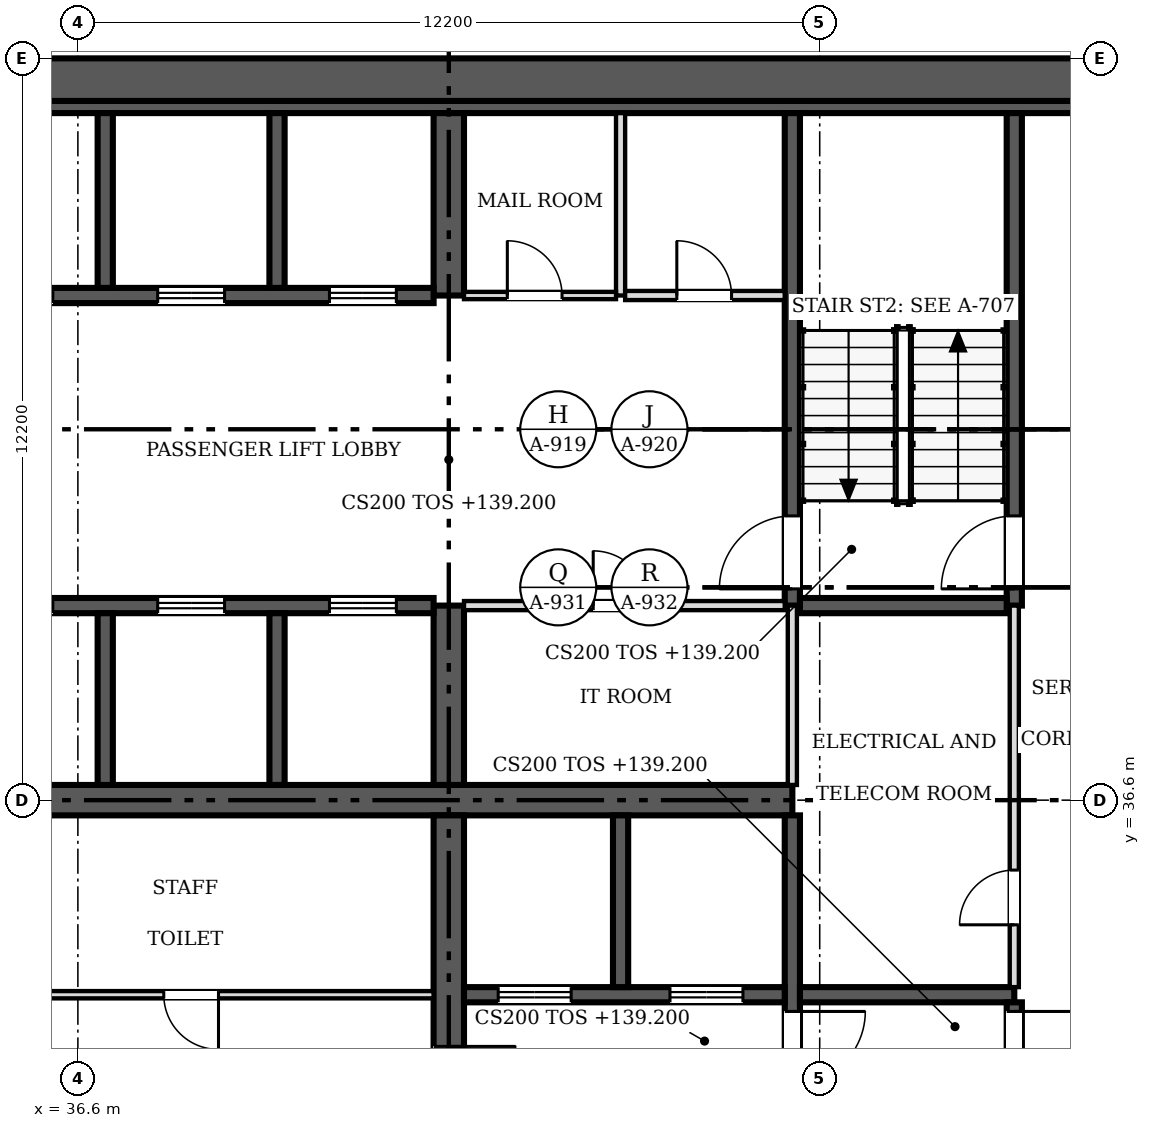
"""IFC4 building model, lengths in metres.
Left out: names, types, materials, properties, quantities, classifications, styles, units other than length and angle.
Written with IfcOpenShell. Run it as: python <this file> out.ifc"""

import sys

from ifc_helpers import new_model, si_unit, direction, frame, frame_2d, origin, place, context, subcontext, project, spatial, rectangle, extrude, source, transform, mapped, element, fill, save


model = new_model("IFC4")
c1 = context("Model", 3, precision=1e-05, world=origin(), true_north=direction((0.0, 1.0)))
c2 = subcontext(c1, "Body", "Model", "MODEL_VIEW")
j1 = project(units=[si_unit("LENGTHUNIT", "METRE"), si_unit("PLANEANGLEUNIT", "RADIAN")], contexts=[c1])
p1 = place(None, origin())
s1 = spatial("IfcSite", under=j1, at=p1, CompositionType="ELEMENT")
p2 = place(p1, origin())
s2 = spatial("IfcBuilding", under=s1, at=p2, CompositionType="ELEMENT")
p3 = place(p2, frame((0.0, 0.0, 139.2)))
s3 = spatial("IfcBuildingStorey", under=s2, at=p3, CompositionType="ELEMENT", Elevation=139.2)
p4 = place(p3, frame((30.5, 48.45, 0.0), z_axis=(0.0, 0.0, 1.0), x_axis=(1.0, 0.0, 0.0)))
e1 = element("IfcWall", 1, at=p4, inside=s3, PredefinedType="SHEAR", context=c2, shape_type="SweptSolid", body=[
    extrude(rectangle(XDim=24.4, YDim=0.7, at=frame_2d((12.2, 0.0))), origin(), (0.0, 0.0, 1.0), 3.8),
])
p5 = place(p3, frame((31.2, 48.0, 0.0), z_axis=(0.0, 0.0, 1.0), x_axis=(1.0, 0.0, 0.0)))
e2 = element("IfcWall", 2, at=p5, inside=s3, PredefinedType="SOLIDWALL", context=c2, shape_type="SweptSolid", body=[
    extrude(rectangle(XDim=23.0, YDim=0.2, at=frame_2d((11.5, 0.0))), origin(), (0.0, 0.0, 1.0), 3.8),
])
p6 = place(p3, frame((31.4, 36.6, 0.0), z_axis=(0.0, 0.0, 1.0), x_axis=(1.0, 0.0, 0.0)))
e3 = element("IfcWall", 3, at=p6, inside=s3, PredefinedType="SHEAR", context=c2, shape_type="SweptSolid", body=[
    extrude(rectangle(XDim=16.95, YDim=0.5, at=frame_2d((8.475, 0.0))), origin(), (0.0, 0.0, 1.0), 3.8),
])
p7 = place(p3, frame((42.7, 36.35, 0.0), z_axis=(0.0, 0.0, 1.0), x_axis=(0.0, -1.0, 0.0)))
e4 = element("IfcWall", 4, at=p7, inside=s3, PredefinedType="SHEAR", context=c2, shape_type="SweptSolid", body=[
    extrude(rectangle(XDim=11.05, YDim=0.5, at=frame_2d((5.525, 0.0))), origin(), (0.0, 0.0, 1.0), 3.8),
])
m1 = source(origin(), c2, "Body", "SweptSolid", [
    extrude(rectangle(XDim=0.9, YDim=2.1, at=frame_2d((0.45, 1.05))), frame((0.0, 0.26, 0.0), z_axis=(0.0, -1.0, 0.0), x_axis=(1.0, 0.0, 0.0)), (0.0, 0.0, 1.0), 0.52),
])
p8 = place(p7, frame((6.5, 0.0, 0.0)))
e5 = element("IfcOpeningElement", 5, at=p8, cuts=e4, PredefinedType="OPENING", context=c2, shape_type="MappedRepresentation", body=[
    mapped(m1, transform((0.0, 0.0, 0.0), scale=1.0)),
])
m2 = source(origin(), c2, "Body", "SweptSolid", [
    extrude(rectangle(XDim=1.1, YDim=2.1, at=frame_2d((0.55, 1.05))), frame((0.0, 0.26, 0.0), z_axis=(0.0, -1.0, 0.0), x_axis=(1.0, 0.0, 0.0)), (0.0, 0.0, 1.0), 0.52),
])
p9 = place(p7, frame((3.8, 0.0, 0.0)))
e6 = element("IfcOpeningElement", 6, at=p9, cuts=e4, PredefinedType="OPENING", context=c2, shape_type="MappedRepresentation", body=[
    mapped(m2, transform((0.0, 0.0, 0.0), scale=1.0)),
])
p10 = place(p3, frame((42.7, 36.85, 0.0), z_axis=(0.0, 0.0, 1.0), x_axis=(0.0, 1.0, 0.0)))
e7 = element("IfcWall", 7, at=p10, inside=s3, PredefinedType="SHEAR", context=c2, shape_type="SweptSolid", body=[
    extrude(rectangle(XDim=2.95, YDim=0.5, at=frame_2d((1.475, 0.0))), origin(), (0.0, 0.0, 1.0), 3.8),
])
p11 = place(p3, frame((42.7, 44.9, 0.0), z_axis=(0.0, 0.0, 1.0), x_axis=(0.0, 1.0, 0.0)))
e8 = element("IfcWall", 8, at=p11, inside=s3, PredefinedType="SHEAR", context=c2, shape_type="SweptSolid", body=[
    extrude(rectangle(XDim=3.0, YDim=0.5, at=frame_2d((1.5, 0.0))), origin(), (0.0, 0.0, 1.0), 3.8),
])
p12 = place(p3, frame((31.4, 39.8, 0.0), z_axis=(0.0, 0.0, 1.0), x_axis=(1.0, 0.0, 0.0)))
e9 = element("IfcWall", 9, at=p12, inside=s3, PredefinedType="SOLIDWALL", context=c2, shape_type="SweptSolid", body=[
    extrude(rectangle(XDim=11.05, YDim=0.25, at=frame_2d((5.525, 0.0))), origin(), (0.0, 0.0, 1.0), 3.8),
])
m3 = source(origin(), c2, "Body", "SweptSolid", [
    extrude(rectangle(XDim=1.1, YDim=2.1, at=frame_2d((0.55, 1.05))), frame((0.0, 0.135, 0.0), z_axis=(0.0, -1.0, 0.0), x_axis=(1.0, 0.0, 0.0)), (0.0, 0.0, 1.0), 0.27),
])
p13 = place(p12, frame((0.863, 0.0, 0.0)))
e10 = element("IfcOpeningElement", 10, at=p13, cuts=e9, PredefinedType="OPENING", context=c2, shape_type="MappedRepresentation", body=[
    mapped(m3, transform((0.0, 0.0, 0.0), scale=1.0)),
])
p14 = place(p12, frame((3.688, 0.0, 0.0)))
e11 = element("IfcOpeningElement", 11, at=p14, cuts=e9, PredefinedType="OPENING", context=c2, shape_type="MappedRepresentation", body=[
    mapped(m3, transform((0.0, 0.0, 0.0), scale=1.0)),
])
p15 = place(p12, frame((6.512, 0.0, 0.0)))
e12 = element("IfcOpeningElement", 12, at=p15, cuts=e9, PredefinedType="OPENING", context=c2, shape_type="MappedRepresentation", body=[
    mapped(m3, transform((0.0, 0.0, 0.0), scale=1.0)),
])
p16 = place(p12, frame((9.337, 0.0, 0.0)))
e13 = element("IfcOpeningElement", 13, at=p16, cuts=e9, PredefinedType="OPENING", context=c2, shape_type="MappedRepresentation", body=[
    mapped(m3, transform((0.0, 0.0, 0.0), scale=1.0)),
])
p17 = place(p3, frame((42.45, 44.9, 0.0), z_axis=(0.0, 0.0, 1.0), x_axis=(-1.0, 0.0, 0.0)))
e14 = element("IfcWall", 14, at=p17, inside=s3, PredefinedType="SOLIDWALL", context=c2, shape_type="SweptSolid", body=[
    extrude(rectangle(XDim=11.05, YDim=0.25, at=frame_2d((5.525, 0.0))), origin(), (0.0, 0.0, 1.0), 3.8),
])
p18 = place(p17, frame((9.087, 0.0, 0.0)))
e15 = element("IfcOpeningElement", 15, at=p18, cuts=e14, PredefinedType="OPENING", context=c2, shape_type="MappedRepresentation", body=[
    mapped(m3, transform((0.0, 0.0, 0.0), scale=1.0)),
])
p19 = place(p17, frame((6.262, 0.0, 0.0)))
e16 = element("IfcOpeningElement", 16, at=p19, cuts=e14, PredefinedType="OPENING", context=c2, shape_type="MappedRepresentation", body=[
    mapped(m3, transform((0.0, 0.0, 0.0), scale=1.0)),
])
p20 = place(p17, frame((3.438, 0.0, 0.0)))
e17 = element("IfcOpeningElement", 17, at=p20, cuts=e14, PredefinedType="OPENING", context=c2, shape_type="MappedRepresentation", body=[
    mapped(m3, transform((0.0, 0.0, 0.0), scale=1.0)),
])
p21 = place(p17, frame((0.613, 0.0, 0.0)))
e18 = element("IfcOpeningElement", 18, at=p21, cuts=e14, PredefinedType="OPENING", context=c2, shape_type="MappedRepresentation", body=[
    mapped(m3, transform((0.0, 0.0, 0.0), scale=1.0)),
])
p22 = place(p3, frame((48.35, 36.35, 0.0), z_axis=(0.0, 0.0, 1.0), x_axis=(0.0, -1.0, 0.0)))
e19 = element("IfcWall", 19, at=p22, inside=s3, PredefinedType="SOLIDWALL", context=c2, shape_type="SweptSolid", body=[
    extrude(rectangle(XDim=11.05, YDim=0.25, at=frame_2d((5.525, 0.0))), origin(), (0.0, 0.0, 1.0), 3.8),
])
m4 = source(origin(), c2, "Body", "SweptSolid", [
    extrude(rectangle(XDim=1.2, YDim=2.1, at=frame_2d((0.6, 1.05))), frame((0.0, 0.135, 0.0), z_axis=(0.0, -1.0, 0.0), x_axis=(1.0, 0.0, 0.0)), (0.0, 0.0, 1.0), 0.27),
])
p23 = place(p22, frame((3.225, 0.0, 0.0)))
e20 = element("IfcOpeningElement", 20, at=p23, cuts=e19, PredefinedType="OPENING", context=c2, shape_type="MappedRepresentation", body=[
    mapped(m4, transform((0.0, 0.0, 0.0), scale=1.0)),
])
p24 = place(p3, frame((48.225, 33.4, 0.0), z_axis=(0.0, 0.0, 1.0), x_axis=(-1.0, 0.0, 0.0)))
e21 = element("IfcWall", 21, at=p24, inside=s3, PredefinedType="SOLIDWALL", context=c2, shape_type="SweptSolid", body=[
    extrude(rectangle(XDim=5.275, YDim=0.25, at=frame_2d((2.638, 0.0))), origin(), (0.0, 0.0, 1.0), 3.8),
])
p25 = place(p24, frame((3.512, 0.0, 0.0)))
e22 = element("IfcOpeningElement", 22, at=p25, cuts=e21, PredefinedType="OPENING", context=c2, shape_type="MappedRepresentation", body=[
    mapped(m4, transform((0.0, 0.0, 0.0), scale=1.0)),
])
p26 = place(p24, frame((0.688, 0.0, 0.0)))
e23 = element("IfcOpeningElement", 23, at=p26, cuts=e21, PredefinedType="OPENING", context=c2, shape_type="MappedRepresentation", body=[
    mapped(m4, transform((0.0, 0.0, 0.0), scale=1.0)),
])
p27 = place(p3, frame((48.475, 33.4, 0.0), z_axis=(0.0, 0.0, 1.0), x_axis=(1.0, 0.0, 0.0)))
e24 = element("IfcWall", 24, at=p27, inside=s3, PredefinedType="SOLIDWALL", context=c2, shape_type="SweptSolid", body=[
    extrude(rectangle(XDim=3.525, YDim=0.25, at=frame_2d((1.762, 0.0))), origin(), (0.0, 0.0, 1.0), 3.8),
])
p28 = place(p3, frame((48.35, 47.9, 0.0), z_axis=(0.0, 0.0, 1.0), x_axis=(0.0, -1.0, 0.0)))
e25 = element("IfcWall", 25, at=p28, inside=s3, PredefinedType="SOLIDWALL", context=c2, shape_type="SweptSolid", body=[
    extrude(rectangle(XDim=8.1, YDim=0.25, at=frame_2d((4.05, 0.0))), origin(), (0.0, 0.0, 1.0), 3.8),
])
p29 = place(p28, frame((6.625, 0.0, 0.0)))
e26 = element("IfcOpeningElement", 26, at=p29, cuts=e25, PredefinedType="OPENING", context=c2, shape_type="MappedRepresentation", body=[
    mapped(m4, transform((0.0, 0.0, 0.0), scale=1.0)),
])
p30 = place(p3, frame((52.0, 25.3, 0.0), z_axis=(0.0, 0.0, 1.0), x_axis=(0.0, 1.0, 0.0)))
e27 = element("IfcWall", 27, at=p30, inside=s3, PredefinedType="SOLIDWALL", context=c2, shape_type="SweptSolid", body=[
    extrude(rectangle(XDim=7.975, YDim=0.25, at=frame_2d((3.987, 0.0))), origin(), (0.0, 0.0, 1.0), 3.8),
])
p31 = place(p30, frame((6.625, 0.0, 0.0)))
e28 = element("IfcOpeningElement", 28, at=p31, cuts=e27, PredefinedType="OPENING", context=c2, shape_type="MappedRepresentation", body=[
    mapped(m4, transform((0.0, 0.0, 0.0), scale=1.0)),
])
p32 = place(p3, frame((52.0, 39.8, 0.0), z_axis=(0.0, 0.0, 1.0), x_axis=(0.0, 1.0, 0.0)))
e29 = element("IfcWall", 29, at=p32, inside=s3, PredefinedType="SOLIDWALL", context=c2, shape_type="SweptSolid", body=[
    extrude(rectangle(XDim=8.1, YDim=0.25, at=frame_2d((4.05, 0.0))), origin(), (0.0, 0.0, 1.0), 3.8),
])
p33 = place(p32, frame((0.275, 0.0, 0.0)))
e30 = element("IfcOpeningElement", 30, at=p33, cuts=e29, PredefinedType="OPENING", context=c2, shape_type="MappedRepresentation", body=[
    mapped(m4, transform((0.0, 0.0, 0.0), scale=1.0)),
])
p34 = place(p3, frame((48.475, 39.8, 0.0), z_axis=(0.0, 0.0, 1.0), x_axis=(1.0, 0.0, 0.0)))
e31 = element("IfcWall", 31, at=p34, inside=s3, PredefinedType="SOLIDWALL", context=c2, shape_type="SweptSolid", body=[
    extrude(rectangle(XDim=3.4, YDim=0.25, at=frame_2d((1.7, 0.0))), origin(), (0.0, 0.0, 1.0), 3.8),
])
for number, where, z_axis, x_axis in (
    (32, (37.05, 36.85, 0.0), (0.0, 0.0, 1.0), (0.0, 1.0, 0.0)),
    (33, (39.875, 36.85, 0.0), (0.0, 0.0, 1.0), (0.0, 1.0, 0.0)),
):
    element("IfcWall", number, at=place(p3, frame(where, z_axis=z_axis, x_axis=x_axis)), inside=s3, PredefinedType="SOLIDWALL", context=c2, shape_type="SweptSolid", body=[
        extrude(rectangle(XDim=2.825, YDim=0.25, at=frame_2d((1.413, 0.0))), origin(), (0.0, 0.0, 1.0), 3.8),
    ])
p35 = place(p3, frame((45.525, 33.525, 0.0), z_axis=(0.0, 0.0, 1.0), x_axis=(0.0, 1.0, 0.0)))
e34 = element("IfcWall", 34, at=p35, inside=s3, PredefinedType="SOLIDWALL", context=c2, shape_type="SweptSolid", body=[
    extrude(rectangle(XDim=2.825, YDim=0.25, at=frame_2d((1.413, 0.0))), origin(), (0.0, 0.0, 1.0), 3.8),
])
for number, where, z_axis, x_axis in (
    (35, (37.05, 45.025, 0.0), (0.0, 0.0, 1.0), (0.0, 1.0, 0.0)),
    (36, (39.875, 45.025, 0.0), (0.0, 0.0, 1.0), (0.0, 1.0, 0.0)),
):
    element("IfcWall", number, at=place(p3, frame(where, z_axis=z_axis, x_axis=x_axis)), inside=s3, PredefinedType="SOLIDWALL", context=c2, shape_type="SweptSolid", body=[
        extrude(rectangle(XDim=2.875, YDim=0.25, at=frame_2d((1.438, 0.0))), origin(), (0.0, 0.0, 1.0), 3.8),
    ])
p36 = place(p3, frame((31.4, 33.4, 0.0), z_axis=(0.0, 0.0, 1.0), x_axis=(1.0, 0.0, 0.0)))
e37 = element("IfcWall", 37, at=p36, inside=s3, PredefinedType="PARTITIONING", context=c2, shape_type="SweptSolid", body=[
    extrude(rectangle(XDim=11.05, YDim=0.12, at=frame_2d((5.525, 0.0))), origin(), (0.0, 0.0, 1.0), 3.6),
])
m5 = source(origin(), c2, "Body", "SweptSolid", [
    extrude(rectangle(XDim=0.9, YDim=2.1, at=frame_2d((0.45, 1.05))), frame((0.0, 0.07, 0.0), z_axis=(0.0, -1.0, 0.0), x_axis=(1.0, 0.0, 0.0)), (0.0, 0.0, 1.0), 0.14),
])
p37 = place(p36, frame((0.962, 0.0, 0.0)))
e38 = element("IfcOpeningElement", 38, at=p37, cuts=e37, PredefinedType="OPENING", context=c2, shape_type="MappedRepresentation", body=[
    mapped(m5, transform((0.0, 0.0, 0.0), scale=1.0)),
])
p38 = place(p36, frame((6.613, 0.0, 0.0)))
e39 = element("IfcOpeningElement", 39, at=p38, cuts=e37, PredefinedType="OPENING", context=c2, shape_type="MappedRepresentation", body=[
    mapped(m5, transform((0.0, 0.0, 0.0), scale=1.0)),
])
p39 = place(p3, frame((52.0, 33.525, 0.0), z_axis=(0.0, 0.0, 1.0), x_axis=(0.0, 1.0, 0.0)))
e40 = element("IfcWall", 40, at=p39, inside=s3, PredefinedType="PARTITIONING", context=c2, shape_type="SweptSolid", body=[
    extrude(rectangle(XDim=6.275, YDim=0.15, at=frame_2d((3.138, 0.0))), origin(), (0.0, 0.0, 1.0), 3.6),
])
m6 = source(origin(), c2, "Body", "SweptSolid", [
    extrude(rectangle(XDim=0.9, YDim=2.1, at=frame_2d((0.45, 1.05))), frame((0.0, 0.085, 0.0), z_axis=(0.0, -1.0, 0.0), x_axis=(1.0, 0.0, 0.0)), (0.0, 0.0, 1.0), 0.17),
])
p40 = place(p39, frame((1.025, 0.0, 0.0)))
e41 = element("IfcOpeningElement", 41, at=p40, cuts=e40, PredefinedType="OPENING", context=c2, shape_type="MappedRepresentation", body=[
    mapped(m6, transform((0.0, 0.0, 0.0), scale=1.0)),
])
p41 = place(p3, frame((48.225, 39.8, 0.0), z_axis=(0.0, 0.0, 1.0), x_axis=(-1.0, 0.0, 0.0)))
e42 = element("IfcWall", 42, at=p41, inside=s3, PredefinedType="PARTITIONING", context=c2, shape_type="SweptSolid", body=[
    extrude(rectangle(XDim=5.275, YDim=0.15, at=frame_2d((2.638, 0.0))), origin(), (0.0, 0.0, 1.0), 3.6),
])
p42 = place(p41, frame((2.25, 0.0, 0.0)))
e43 = element("IfcOpeningElement", 43, at=p42, cuts=e42, PredefinedType="OPENING", context=c2, shape_type="MappedRepresentation", body=[
    mapped(m6, transform((0.0, 0.0, 0.0), scale=1.0)),
])
p43 = place(p3, frame((48.35, 36.85, 0.0), z_axis=(0.0, 0.0, 1.0), x_axis=(0.0, 1.0, 0.0)))
e44 = element("IfcWall", 44, at=p43, inside=s3, PredefinedType="PARTITIONING", context=c2, shape_type="SweptSolid", body=[
    extrude(rectangle(XDim=2.95, YDim=0.15, at=frame_2d((1.475, 0.0))), origin(), (0.0, 0.0, 1.0), 3.6),
])
p44 = place(p3, frame((45.525, 44.9, 0.0), z_axis=(0.0, 0.0, 1.0), x_axis=(0.0, 1.0, 0.0)))
e45 = element("IfcWall", 45, at=p44, inside=s3, PredefinedType="PARTITIONING", context=c2, shape_type="SweptSolid", body=[
    extrude(rectangle(XDim=3.0, YDim=0.15, at=frame_2d((1.5, 0.0))), origin(), (0.0, 0.0, 1.0), 3.6),
])
p45 = place(p3, frame((42.95, 44.9, 0.0), z_axis=(0.0, 0.0, 1.0), x_axis=(1.0, 0.0, 0.0)))
e46 = element("IfcWall", 46, at=p45, inside=s3, PredefinedType="PARTITIONING", context=c2, shape_type="SweptSolid", body=[
    extrude(rectangle(XDim=2.5, YDim=0.12, at=frame_2d((1.25, 0.0))), origin(), (0.0, 0.0, 1.0), 3.6),
])
p46 = place(p45, frame((0.712, 0.0, 0.0)))
e47 = element("IfcOpeningElement", 47, at=p46, cuts=e46, PredefinedType="OPENING", context=c2, shape_type="MappedRepresentation", body=[
    mapped(m5, transform((0.0, 0.0, 0.0), scale=1.0)),
])
p47 = place(p3, frame((45.6, 44.9, 0.0), z_axis=(0.0, 0.0, 1.0), x_axis=(1.0, 0.0, 0.0)))
e48 = element("IfcWall", 48, at=p47, inside=s3, PredefinedType="PARTITIONING", context=c2, shape_type="SweptSolid", body=[
    extrude(rectangle(XDim=2.625, YDim=0.15, at=frame_2d((1.312, 0.0))), origin(), (0.0, 0.0, 1.0), 3.6),
])
p48 = place(p47, frame((0.85, 0.0, 0.0)))
e49 = element("IfcOpeningElement", 49, at=p48, cuts=e48, PredefinedType="OPENING", context=c2, shape_type="MappedRepresentation", body=[
    mapped(m6, transform((0.0, 0.0, 0.0), scale=1.0)),
])
m7 = source(origin(), c2, "Body", "SweptSolid", [
    extrude(rectangle(XDim=1.1, YDim=2.1, at=frame_2d((0.55, 1.05))), frame((0.0, 0.025, 0.0), z_axis=(0.0, -1.0, 0.0), x_axis=(1.0, 0.0, 0.0)), (0.0, 0.0, 1.0), 0.05),
])
p49 = place(p9, origin())
e50 = element("IfcDoor", 50, at=p49, inside=s3, OperationType="SINGLE_SWING_LEFT", PredefinedType="DOOR", context=c2, shape_type="MappedRepresentation", body=[
    mapped(m7, transform((0.0, 0.0, 0.0), scale=1.0)),
])
fill(e6, e50)
p50 = place(p14, origin())
e51 = element("IfcDoor", 51, at=p50, inside=s3, OperationType="DOUBLE_DOOR_SLIDING", PredefinedType="DOOR", context=c2, shape_type="MappedRepresentation", body=[
    mapped(m7, transform((0.0, 0.0, 0.0), scale=1.0)),
])
fill(e11, e51)
p51 = place(p15, origin())
e52 = element("IfcDoor", 52, at=p51, inside=s3, OperationType="DOUBLE_DOOR_SLIDING", PredefinedType="DOOR", context=c2, shape_type="MappedRepresentation", body=[
    mapped(m7, transform((0.0, 0.0, 0.0), scale=1.0)),
])
fill(e12, e52)
p52 = place(p16, origin())
e53 = element("IfcDoor", 53, at=p52, inside=s3, OperationType="DOUBLE_DOOR_SLIDING", PredefinedType="DOOR", context=c2, shape_type="MappedRepresentation", body=[
    mapped(m7, transform((0.0, 0.0, 0.0), scale=1.0)),
])
fill(e13, e53)
p53 = place(p19, origin())
e54 = element("IfcDoor", 54, at=p53, inside=s3, OperationType="DOUBLE_DOOR_SLIDING", PredefinedType="DOOR", context=c2, shape_type="MappedRepresentation", body=[
    mapped(m7, transform((0.0, 0.0, 0.0), scale=1.0)),
])
fill(e16, e54)
p54 = place(p20, origin())
e55 = element("IfcDoor", 55, at=p54, inside=s3, OperationType="DOUBLE_DOOR_SLIDING", PredefinedType="DOOR", context=c2, shape_type="MappedRepresentation", body=[
    mapped(m7, transform((0.0, 0.0, 0.0), scale=1.0)),
])
fill(e17, e55)
p55 = place(p21, origin())
e56 = element("IfcDoor", 56, at=p55, inside=s3, OperationType="DOUBLE_DOOR_SLIDING", PredefinedType="DOOR", context=c2, shape_type="MappedRepresentation", body=[
    mapped(m7, transform((0.0, 0.0, 0.0), scale=1.0)),
])
fill(e18, e56)
m8 = source(origin(), c2, "Body", "SweptSolid", [
    extrude(rectangle(XDim=1.2, YDim=2.1, at=frame_2d((0.6, 1.05))), frame((0.0, 0.025, 0.0), z_axis=(0.0, -1.0, 0.0), x_axis=(1.0, 0.0, 0.0)), (0.0, 0.0, 1.0), 0.05),
])
p56 = place(p23, origin())
e57 = element("IfcDoor", 57, at=p56, inside=s3, OperationType="SINGLE_SWING_LEFT", PredefinedType="DOOR", context=c2, shape_type="MappedRepresentation", body=[
    mapped(m8, transform((0.0, 0.0, 0.0), scale=1.0)),
])
fill(e20, e57)
p57 = place(p25, origin())
e58 = element("IfcDoor", 58, at=p57, inside=s3, OperationType="DOUBLE_DOOR_SLIDING", PredefinedType="DOOR", context=c2, shape_type="MappedRepresentation", body=[
    mapped(m8, transform((0.0, 0.0, 0.0), scale=1.0)),
])
fill(e22, e58)
p58 = place(p26, origin())
e59 = element("IfcDoor", 59, at=p58, inside=s3, OperationType="DOUBLE_DOOR_SLIDING", PredefinedType="DOOR", context=c2, shape_type="MappedRepresentation", body=[
    mapped(m8, transform((0.0, 0.0, 0.0), scale=1.0)),
])
fill(e23, e59)
p59 = place(p29, origin())
e60 = element("IfcDoor", 60, at=p59, inside=s3, OperationType="SINGLE_SWING_RIGHT", PredefinedType="DOOR", context=c2, shape_type="MappedRepresentation", body=[
    mapped(m8, transform((0.0, 0.0, 0.0), scale=1.0)),
])
fill(e26, e60)
p60 = place(p31, origin())
e61 = element("IfcDoor", 61, at=p60, inside=s3, OperationType="SINGLE_SWING_RIGHT", PredefinedType="DOOR", context=c2, shape_type="MappedRepresentation", body=[
    mapped(m8, transform((0.0, 0.0, 0.0), scale=1.0)),
])
fill(e28, e61)
p61 = place(p33, origin())
e62 = element("IfcDoor", 62, at=p61, inside=s3, OperationType="SINGLE_SWING_LEFT", PredefinedType="DOOR", context=c2, shape_type="MappedRepresentation", body=[
    mapped(m8, transform((0.0, 0.0, 0.0), scale=1.0)),
])
fill(e30, e62)
m9 = source(origin(), c2, "Body", "SweptSolid", [
    extrude(rectangle(XDim=0.9, YDim=2.1, at=frame_2d((0.45, 1.05))), frame((0.0, 0.025, 0.0), z_axis=(0.0, -1.0, 0.0), x_axis=(1.0, 0.0, 0.0)), (0.0, 0.0, 1.0), 0.05),
])
p62 = place(p38, origin())
e63 = element("IfcDoor", 63, at=p62, inside=s3, OperationType="SINGLE_SWING_RIGHT", PredefinedType="DOOR", context=c2, shape_type="MappedRepresentation", body=[
    mapped(m9, transform((0.0, 0.0, 0.0), scale=1.0)),
])
fill(e39, e63)
p63 = place(p40, origin())
e64 = element("IfcDoor", 64, at=p63, inside=s3, OperationType="SINGLE_SWING_LEFT", PredefinedType="DOOR", context=c2, shape_type="MappedRepresentation", body=[
    mapped(m9, transform((0.0, 0.0, 0.0), scale=1.0)),
])
fill(e41, e64)
p64 = place(p42, origin())
e65 = element("IfcDoor", 65, at=p64, inside=s3, OperationType="SINGLE_SWING_RIGHT", PredefinedType="DOOR", context=c2, shape_type="MappedRepresentation", body=[
    mapped(m9, transform((0.0, 0.0, 0.0), scale=1.0)),
])
fill(e43, e65)
p65 = place(p46, origin())
e66 = element("IfcDoor", 66, at=p65, inside=s3, OperationType="SINGLE_SWING_LEFT", PredefinedType="DOOR", context=c2, shape_type="MappedRepresentation", body=[
    mapped(m9, transform((0.0, 0.0, 0.0), scale=1.0)),
])
fill(e47, e66)
p66 = place(p48, origin())
e67 = element("IfcDoor", 67, at=p66, inside=s3, OperationType="SINGLE_SWING_LEFT", PredefinedType="DOOR", context=c2, shape_type="MappedRepresentation", body=[
    mapped(m9, transform((0.0, 0.0, 0.0), scale=1.0)),
])
fill(e49, e67)
save(model, sys.argv[1])
